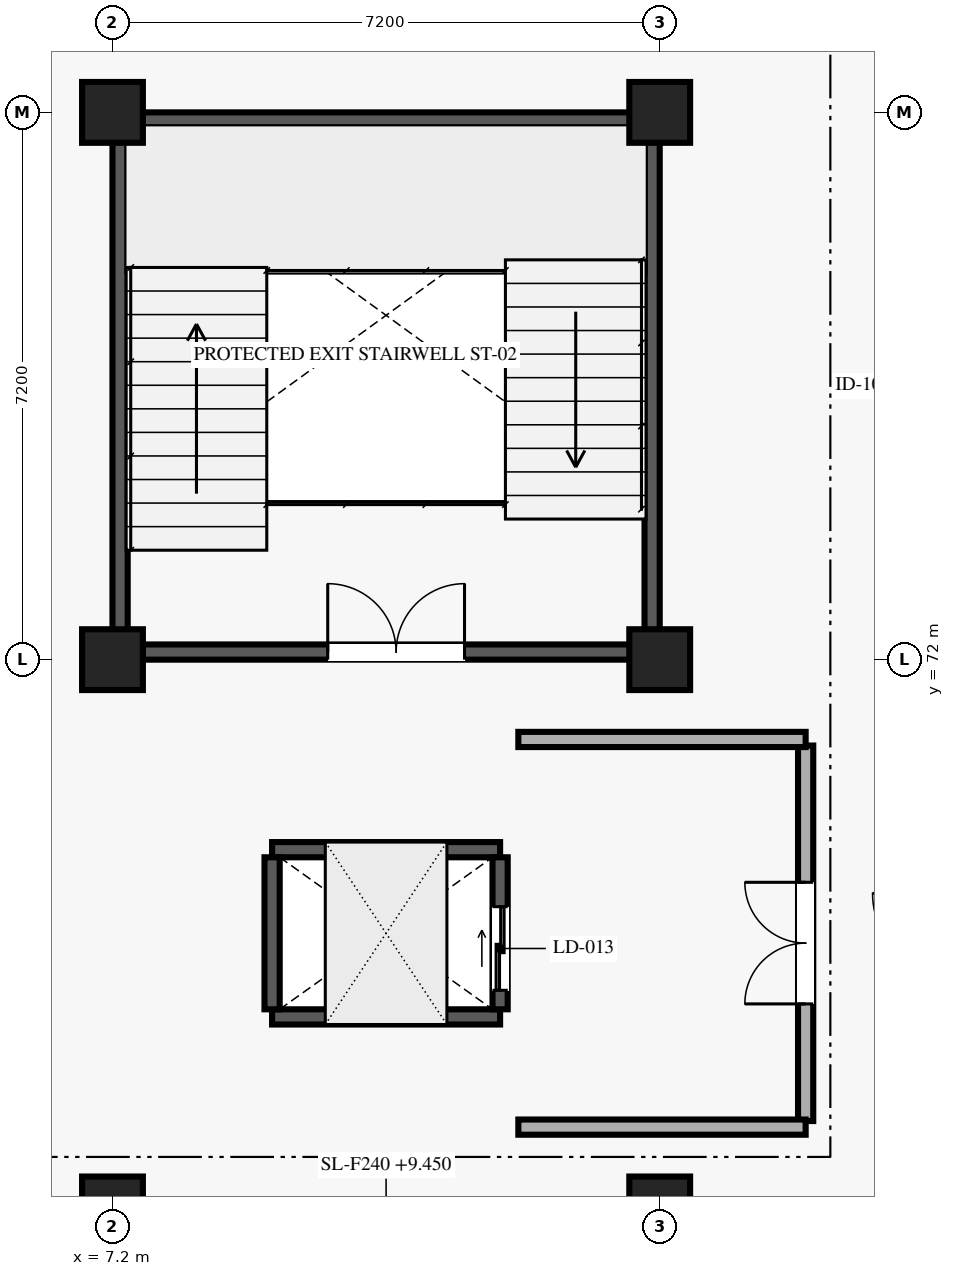
"""IFC4 building model, lengths in metres.
Left out: names, types, materials, properties, quantities, classifications, styles, units other than length and angle.
Written with IfcOpenShell. Run it as: python <this file> out.ifc"""

import sys

from ifc_helpers import new_model, si_unit, direction, frame, frame_2d, origin, origin_2d, place, context, subcontext, project, spatial, rectangle, extrude, element, fill, save


model = new_model("IFC4")
c1 = context("Model", 3, precision=1e-05, world=origin(), true_north=direction((0.0, 1.0)))
c2 = subcontext(c1, "Body", "Model", "MODEL_VIEW")
j1 = project(units=[si_unit("LENGTHUNIT", "METRE"), si_unit("PLANEANGLEUNIT", "RADIAN")], contexts=[c1])
p1 = place(None, origin())
s1 = spatial("IfcSite", under=j1, at=p1, CompositionType="ELEMENT")
p2 = place(p1, origin())
s2 = spatial("IfcBuilding", under=s1, at=p2, CompositionType="ELEMENT")
p3 = place(p2, frame((0.0, 0.0, 9.45)))
s3 = spatial("IfcBuildingStorey", under=s2, at=p3, CompositionType="ELEMENT", Elevation=9.45)
for number, where, z_axis, x_axis in (
    (1, (7.2, 64.8, 0.0), (0.0, 0.0, 1.0), (1.0, 0.0, 0.0)),
    (2, (7.2, 72.0, 0.0), (0.0, 0.0, 1.0), (1.0, 0.0, 0.0)),
    (3, (7.2, 79.2, 0.0), (0.0, 0.0, 1.0), (1.0, 0.0, 0.0)),
    (4, (14.4, 64.8, 0.0), (0.0, 0.0, 1.0), (1.0, 0.0, 0.0)),
    (5, (14.4, 72.0, 0.0), (0.0, 0.0, 1.0), (1.0, 0.0, 0.0)),
    (6, (14.4, 79.2, 0.0), (0.0, 0.0, 1.0), (1.0, 0.0, 0.0)),
):
    element("IfcColumn", number, at=place(p3, frame(where, z_axis=z_axis, x_axis=x_axis)), inside=s3, PredefinedType="COLUMN", context=c2, shape_type="SweptSolid", body=[
        extrude(rectangle(XDim=0.8, YDim=0.8, at=origin_2d()), origin(), (0.0, 0.0, 1.0), 4.05),
    ])
p4 = place(p3, frame((7.4, 72.1, 0.0), z_axis=(0.0, 0.0, 1.0), x_axis=(1.0, 0.0, 0.0)))
e7 = element("IfcWall", 7, at=p4, inside=s3, PredefinedType="SHEAR", context=c2, shape_type="SweptSolid", body=[
    extrude(rectangle(XDim=6.8, YDim=0.2, at=frame_2d((3.4, 0.0))), origin(), (0.0, 0.0, 1.0), 3.81),
])
p5 = place(p4, frame((2.632, 0.0, 0.0)))
e8 = element("IfcOpeningElement", 8, at=p5, cuts=e7, PredefinedType="OPENING", context=c2, shape_type="SweptSolid", body=[
    extrude(rectangle(XDim=1.8, YDim=2.2, at=frame_2d((0.9, 1.1))), frame((0.0, 0.11, 0.0), z_axis=(0.0, -1.0, 0.0), x_axis=(1.0, 0.0, 0.0)), (0.0, 0.0, 1.0), 0.22),
])
for number, where, z_axis, x_axis in (
    (9, (7.4, 79.1, 0.0), (0.0, 0.0, 1.0), (1.0, 0.0, 0.0)),
    (10, (7.3, 72.2, 0.0), (0.0, 0.0, 1.0), (0.0, 1.0, 0.0)),
    (11, (14.3, 72.2, 0.0), (0.0, 0.0, 1.0), (0.0, 1.0, 0.0)),
):
    element("IfcWall", number, at=place(p3, frame(where, z_axis=z_axis, x_axis=x_axis)), inside=s3, PredefinedType="SHEAR", context=c2, shape_type="SweptSolid", body=[
        extrude(rectangle(XDim=6.8, YDim=0.2, at=frame_2d((3.4, 0.0))), origin(), (0.0, 0.0, 1.0), 3.81),
    ])
for number, where, z_axis, x_axis in (
    (12, (9.3, 67.3, 0.0), (0.0, 0.0, 1.0), (1.0, 0.0, 0.0)),
    (13, (9.3, 69.5, 0.0), (0.0, 0.0, 1.0), (1.0, 0.0, 0.0)),
):
    element("IfcWall", number, at=place(p3, frame(where, z_axis=z_axis, x_axis=x_axis)), inside=s3, PredefinedType="SHEAR", context=c2, shape_type="SweptSolid", body=[
        extrude(rectangle(XDim=3.0, YDim=0.2, at=frame_2d((1.5, 0.0))), origin(), (0.0, 0.0, 1.0), 3.81),
    ])
p6 = place(p3, frame((9.3, 67.4, 0.0), z_axis=(0.0, 0.0, 1.0), x_axis=(0.0, 1.0, 0.0)))
e14 = element("IfcWall", 14, at=p6, inside=s3, PredefinedType="SHEAR", context=c2, shape_type="SweptSolid", body=[
    extrude(rectangle(XDim=2.0, YDim=0.2, at=frame_2d((1.0, 0.0))), origin(), (0.0, 0.0, 1.0), 3.81),
])
p7 = place(p3, frame((12.3, 67.4, 0.0), z_axis=(0.0, 0.0, 1.0), x_axis=(0.0, 1.0, 0.0)))
e15 = element("IfcWall", 15, at=p7, inside=s3, PredefinedType="SHEAR", context=c2, shape_type="SweptSolid", body=[
    extrude(rectangle(XDim=2.0, YDim=0.2, at=frame_2d((1.0, 0.0))), origin(), (0.0, 0.0, 1.0), 3.81),
])
p8 = place(p7, frame((0.25, 0.0, 0.0)))
e16 = element("IfcOpeningElement", 16, at=p8, cuts=e15, PredefinedType="OPENING", context=c2, shape_type="SweptSolid", body=[
    extrude(rectangle(XDim=1.1, YDim=2.15, at=frame_2d((0.55, 1.075))), frame((0.0, 0.11, 0.0), z_axis=(0.0, -1.0, 0.0), x_axis=(1.0, 0.0, 0.0)), (0.0, 0.0, 1.0), 0.22),
])
p9 = place(p3, frame((16.32, 65.93, 0.0), z_axis=(0.0, 0.0, 1.0), x_axis=(0.0, 1.0, 0.0)))
e17 = element("IfcWall", 17, at=p9, inside=s3, PredefinedType="SOLIDWALL", context=c2, shape_type="SweptSolid", body=[
    extrude(rectangle(XDim=4.94, YDim=0.2, at=frame_2d((2.47, 0.0))), origin(), (0.0, 0.0, 1.0), 3.81),
])
p10 = place(p9, frame((1.541, 0.0, 0.0)))
e18 = element("IfcOpeningElement", 18, at=p10, cuts=e17, PredefinedType="OPENING", context=c2, shape_type="SweptSolid", body=[
    extrude(rectangle(XDim=1.6, YDim=2.2, at=frame_2d((0.8, 1.1))), frame((0.0, 0.11, 0.0), z_axis=(0.0, -1.0, 0.0), x_axis=(1.0, 0.0, 0.0)), (0.0, 0.0, 1.0), 0.22),
])
for number, where, z_axis, x_axis in (
    (19, (12.54, 65.85, 0.0), (0.0, 0.0, 1.0), (1.0, 0.0, 0.0)),
    (20, (12.54, 70.95, 0.0), (0.0, 0.0, 1.0), (1.0, 0.0, 0.0)),
):
    element("IfcWall", number, at=place(p3, frame(where, z_axis=z_axis, x_axis=x_axis)), inside=s3, PredefinedType="SOLIDWALL", context=c2, shape_type="SweptSolid", body=[
        extrude(rectangle(XDim=3.78, YDim=0.2, at=frame_2d((1.89, 0.0))), origin(), (0.0, 0.0, 1.0), 3.81),
    ])
p11 = place(p5, origin())
e21 = element("IfcDoor", 21, at=p11, inside=s3, OperationType="DOUBLE_DOOR_SINGLE_SWING", PredefinedType="DOOR", context=c2, shape_type="SweptSolid", body=[
    extrude(rectangle(XDim=1.8, YDim=2.2, at=frame_2d((0.9, 1.1))), frame((0.0, 0.025, 0.0), z_axis=(0.0, -1.0, 0.0), x_axis=(1.0, 0.0, 0.0)), (0.0, 0.0, 1.0), 0.05),
])
fill(e8, e21)
p12 = place(p8, origin())
e22 = element("IfcDoor", 22, at=p12, inside=s3, OperationType="DOUBLE_DOOR_SLIDING", PredefinedType="DOOR", context=c2, shape_type="SweptSolid", body=[
    extrude(rectangle(XDim=1.1, YDim=2.15, at=frame_2d((0.55, 1.075))), frame((0.0, 0.025, 0.0), z_axis=(0.0, -1.0, 0.0), x_axis=(1.0, 0.0, 0.0)), (0.0, 0.0, 1.0), 0.05),
])
fill(e16, e22)
p13 = place(p10, origin())
e23 = element("IfcDoor", 23, at=p13, inside=s3, OperationType="DOUBLE_DOOR_SINGLE_SWING", PredefinedType="DOOR", context=c2, shape_type="SweptSolid", body=[
    extrude(rectangle(XDim=1.6, YDim=2.2, at=frame_2d((0.8, 1.1))), frame((0.0, 0.025, 0.0), z_axis=(0.0, -1.0, 0.0), x_axis=(1.0, 0.0, 0.0)), (0.0, 0.0, 1.0), 0.05),
])
fill(e18, e23)
save(model, sys.argv[1])
